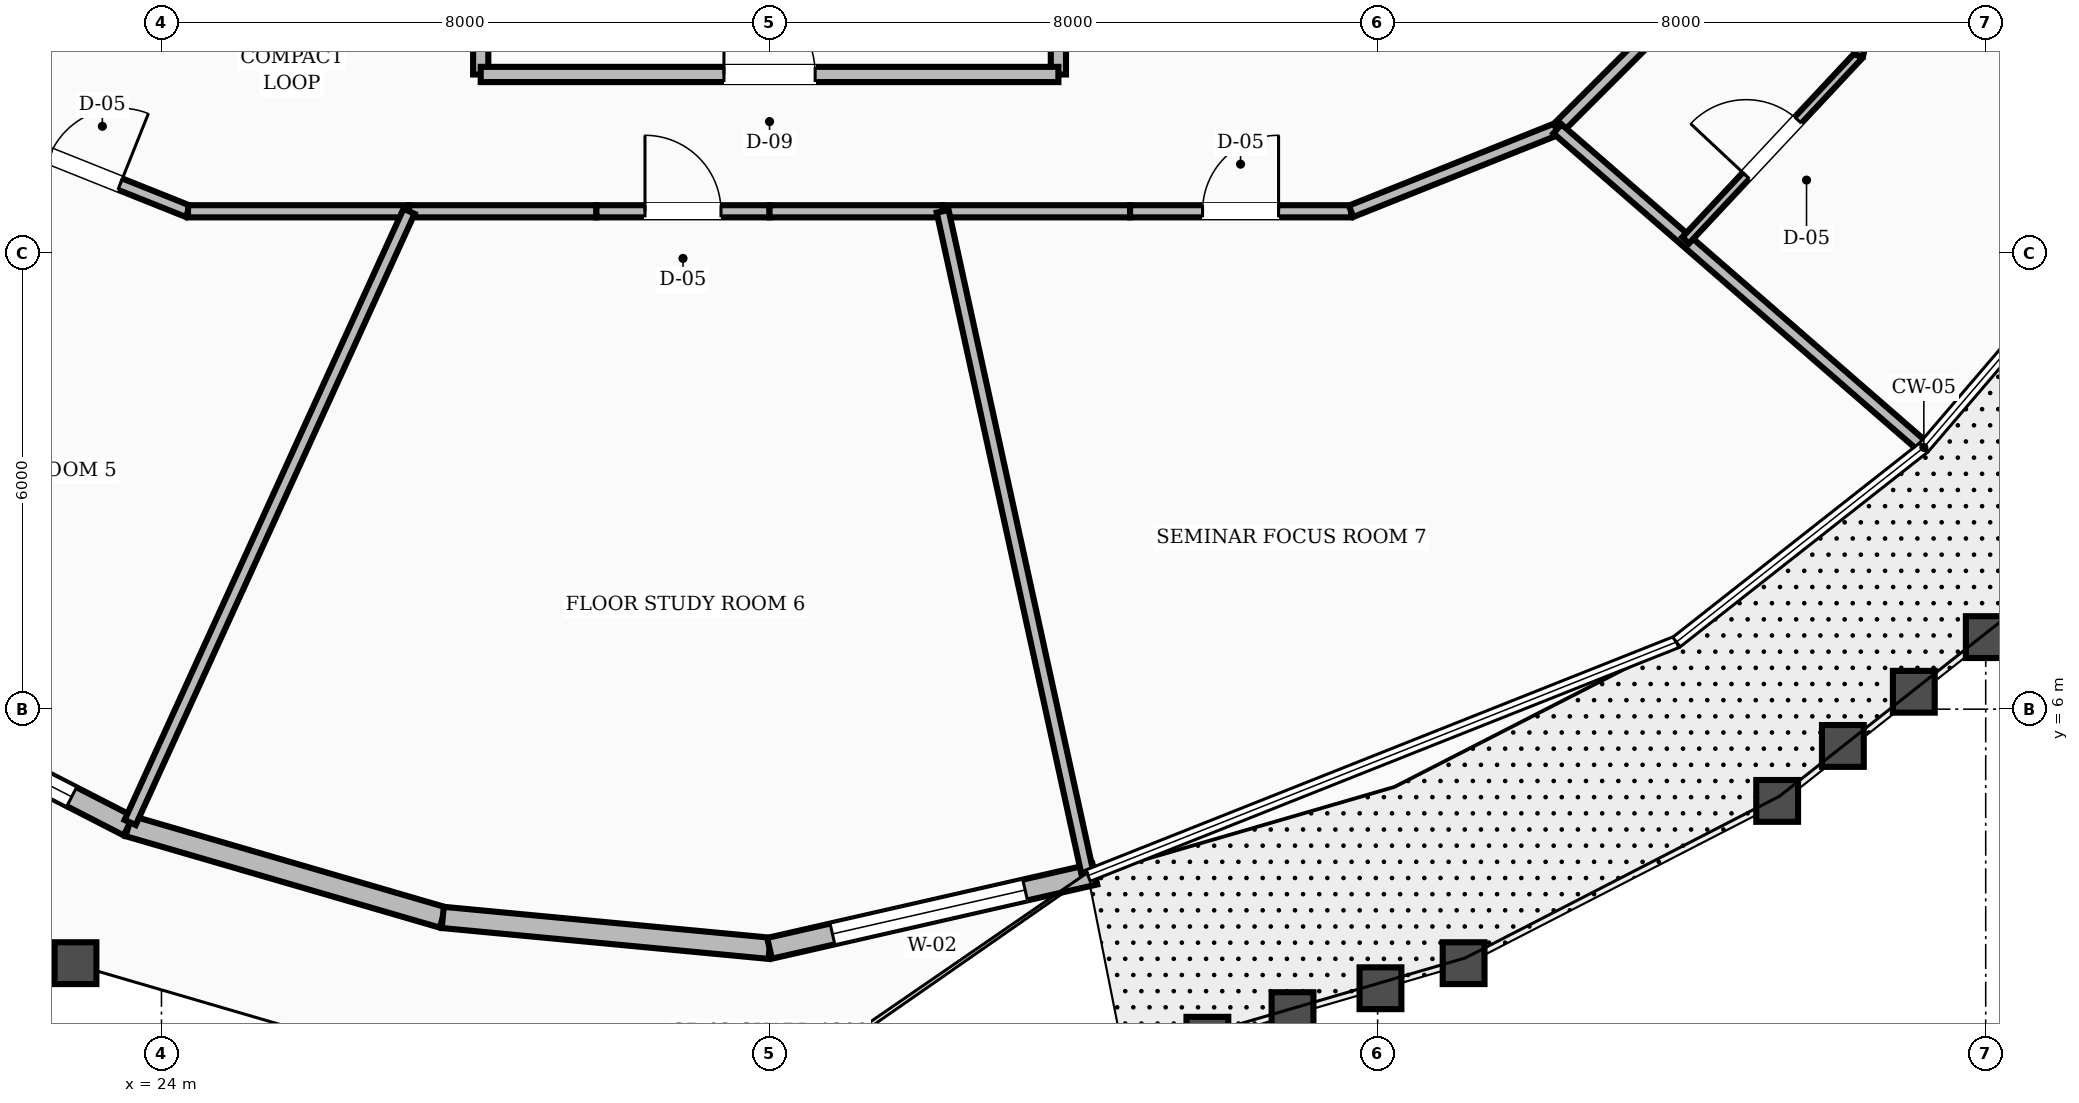
"""IFC4 building model, lengths in metres.
Left out: names, types, materials, properties, quantities, classifications, styles, units other than length and angle.
Written with IfcOpenShell. Run it as: python <this file> out.ifc"""

import sys

from ifc_helpers import new_model, si_unit, direction, frame, frame_2d, origin, place, context, subcontext, project, spatial, rectangle, extrude, element, fill, save


model = new_model("IFC4")
c1 = context("Model", 3, precision=1e-05, world=origin(), true_north=direction((0.0, 1.0)))
c2 = subcontext(c1, "Body", "Model", "MODEL_VIEW")
j1 = project(units=[si_unit("LENGTHUNIT", "METRE"), si_unit("PLANEANGLEUNIT", "RADIAN")], contexts=[c1])
p1 = place(None, origin())
s1 = spatial("IfcSite", under=j1, at=p1, CompositionType="ELEMENT")
p2 = place(p1, origin())
s2 = spatial("IfcBuilding", under=s1, at=p2, CompositionType="ELEMENT")
p3 = place(p2, frame((0.0, 0.0, 236.4)))
s3 = spatial("IfcBuildingStorey", under=s2, at=p3, CompositionType="ELEMENT", Elevation=236.4)
p4 = place(p3, frame((19.757, 6.418, 0.0), z_axis=(0.0, 0.0, 1.0), x_axis=(0.889784216581, -0.456381471933, 0.0)))
e1 = element("IfcWall", 1, at=p4, inside=s3, PredefinedType="STANDARD", context=c2, shape_type="SweptSolid", body=[
    extrude(rectangle(XDim=4.282, YDim=0.28, at=frame_2d((2.141, 0.0))), origin(), (0.0, 0.0, 1.0), 2.88),
])
p5 = place(p4, frame((0.841, 0.0, 0.8)))
e2 = element("IfcOpeningElement", 2, at=p5, cuts=e1, PredefinedType="OPENING", context=c2, shape_type="SweptSolid", body=[
    extrude(rectangle(XDim=2.6, YDim=1.65, at=frame_2d((1.3, 0.825))), frame((0.0, 0.15, 0.0), z_axis=(0.0, -1.0, 0.0), x_axis=(1.0, 0.0, 0.0)), (0.0, 0.0, 1.0), 0.3),
])
p6 = place(p3, frame((23.567, 4.464, 0.0), z_axis=(0.0, 0.0, 1.0), x_axis=(0.960144675866, -0.279503490866, 0.0)))
e3 = element("IfcWall", 3, at=p6, inside=s3, PredefinedType="STANDARD", context=c2, shape_type="SweptSolid", body=[
    extrude(rectangle(XDim=4.305, YDim=0.28, at=frame_2d((2.153, 0.0))), origin(), (0.0, 0.0, 1.0), 2.88),
])
p7 = place(p3, frame((27.701, 3.26, 0.0), z_axis=(0.0, 0.0, 1.0), x_axis=(0.995564827598, -0.094078021076, 0.0)))
e4 = element("IfcWall", 4, at=p7, inside=s3, PredefinedType="STANDARD", context=c2, shape_type="SweptSolid", body=[
    extrude(rectangle(XDim=4.318, YDim=0.28, at=frame_2d((2.159, 0.0))), origin(), (0.0, 0.0, 1.0), 2.88),
])
p8 = place(p3, frame((32.0, 2.854, 0.0), z_axis=(0.0, 0.0, 1.0), x_axis=(0.974962649588, 0.22236868464, 0.0)))
e5 = element("IfcWall", 5, at=p8, inside=s3, PredefinedType="STANDARD", context=c2, shape_type="SweptSolid", body=[
    extrude(rectangle(XDim=4.389, YDim=0.28, at=frame_2d((2.195, 0.0))), origin(), (0.0, 0.0, 1.0), 2.88),
])
p9 = place(p8, frame((0.849, 0.0, 0.8)))
e6 = element("IfcOpeningElement", 6, at=p9, cuts=e5, PredefinedType="OPENING", context=c2, shape_type="SweptSolid", body=[
    extrude(rectangle(XDim=2.6, YDim=1.65, at=frame_2d((1.3, 0.825))), frame((0.0, 0.15, 0.0), z_axis=(0.0, -1.0, 0.0), x_axis=(1.0, 0.0, 0.0)), (0.0, 0.0, 1.0), 0.3),
])
for number, where, z_axis, x_axis in (
    (7, (28.2, 14.35, 0.0), (0.0, 0.0, 1.0), (0.0, 1.0, 0.0)),
    (8, (35.8, 14.35, 0.0), (0.0, 0.0, 1.0), (0.0, 1.0, 0.0)),
):
    element("IfcWall", number, at=place(p3, frame(where, z_axis=z_axis, x_axis=x_axis)), inside=s3, PredefinedType="SOLIDWALL", context=c2, shape_type="SweptSolid", body=[
        extrude(rectangle(XDim=2.2, YDim=0.2, at=frame_2d((1.1, 0.0))), origin(), (0.0, 0.0, 1.0), 2.87),
    ])
p10 = place(p3, frame((28.2, 14.35, 0.0), z_axis=(0.0, 0.0, 1.0), x_axis=(1.0, 0.0, 0.0)))
e9 = element("IfcWall", 9, at=p10, inside=s3, PredefinedType="SOLIDWALL", context=c2, shape_type="SweptSolid", body=[
    extrude(rectangle(XDim=7.6, YDim=0.2, at=frame_2d((3.8, 0.0))), origin(), (0.0, 0.0, 1.0), 2.87),
])
p11 = place(p10, frame((3.2, 0.0, 0.0)))
e10 = element("IfcOpeningElement", 10, at=p11, cuts=e9, PredefinedType="OPENING", context=c2, shape_type="SweptSolid", body=[
    extrude(rectangle(XDim=1.2, YDim=2.1, at=frame_2d((0.6, 1.05))), frame((0.0, 0.11, 0.0), z_axis=(0.0, -1.0, 0.0), x_axis=(1.0, 0.0, 0.0)), (0.0, 0.0, 1.0), 0.22),
])
p12 = place(p3, frame((21.635, 13.635, 0.0), z_axis=(0.0, 0.0, 1.0), x_axis=(0.92856882165, -0.371160266542, 0.0)))
e11 = element("IfcWall", 11, at=p12, inside=s3, PredefinedType="SOLIDWALL", context=c2, shape_type="SweptSolid", body=[
    extrude(rectangle(XDim=2.923, YDim=0.16, at=frame_2d((1.461, 0.0))), origin(), (0.0, 0.0, 1.0), 2.87),
])
p13 = place(p12, frame((0.962, 0.0, 0.0)))
e12 = element("IfcOpeningElement", 12, at=p13, cuts=e11, PredefinedType="OPENING", context=c2, shape_type="SweptSolid", body=[
    extrude(rectangle(XDim=1.0, YDim=2.1, at=frame_2d((0.5, 1.05))), frame((0.0, 0.09, 0.0), z_axis=(0.0, -1.0, 0.0), x_axis=(1.0, 0.0, 0.0)), (0.0, 0.0, 1.0), 0.18),
])
p14 = place(p3, frame((24.349, 12.55, 0.0), z_axis=(0.0, 0.0, 1.0), x_axis=(1.0, 0.0, 0.0)))
e13 = element("IfcWall", 13, at=p14, inside=s3, PredefinedType="SOLIDWALL", context=c2, shape_type="SweptSolid", body=[
    extrude(rectangle(XDim=2.908, YDim=0.16, at=frame_2d((1.454, 0.0))), origin(), (0.0, 0.0, 1.0), 2.87),
])
p15 = place(p3, frame((27.257, 12.55, 0.0), z_axis=(0.0, 0.0, 1.0), x_axis=(1.0, 0.0, 0.0)))
e14 = element("IfcWall", 14, at=p15, inside=s3, PredefinedType="SOLIDWALL", context=c2, shape_type="SweptSolid", body=[
    extrude(rectangle(XDim=2.465, YDim=0.16, at=frame_2d((1.232, 0.0))), origin(), (0.0, 0.0, 1.0), 2.87),
])
p16 = place(p3, frame((29.722, 12.55, 0.0), z_axis=(0.0, 0.0, 1.0), x_axis=(1.0, 0.0, 0.0)))
e15 = element("IfcWall", 15, at=p16, inside=s3, PredefinedType="SOLIDWALL", context=c2, shape_type="SweptSolid", body=[
    extrude(rectangle(XDim=2.278, YDim=0.16, at=frame_2d((1.139, 0.0))), origin(), (0.0, 0.0, 1.0), 2.87),
])
p17 = place(p16, frame((0.639, 0.0, 0.0)))
e16 = element("IfcOpeningElement", 16, at=p17, cuts=e15, PredefinedType="OPENING", context=c2, shape_type="SweptSolid", body=[
    extrude(rectangle(XDim=1.0, YDim=2.1, at=frame_2d((0.5, 1.05))), frame((0.0, 0.09, 0.0), z_axis=(0.0, -1.0, 0.0), x_axis=(1.0, 0.0, 0.0)), (0.0, 0.0, 1.0), 0.18),
])
p18 = place(p3, frame((32.0, 12.55, 0.0), z_axis=(0.0, 0.0, 1.0), x_axis=(1.0, 0.0, 0.0)))
e17 = element("IfcWall", 17, at=p18, inside=s3, PredefinedType="SOLIDWALL", context=c2, shape_type="SweptSolid", body=[
    extrude(rectangle(XDim=2.278, YDim=0.16, at=frame_2d((1.139, 0.0))), origin(), (0.0, 0.0, 1.0), 2.87),
])
p19 = place(p3, frame((34.278, 12.55, 0.0), z_axis=(0.0, 0.0, 1.0), x_axis=(1.0, 0.0, 0.0)))
e18 = element("IfcWall", 18, at=p19, inside=s3, PredefinedType="SOLIDWALL", context=c2, shape_type="SweptSolid", body=[
    extrude(rectangle(XDim=2.465, YDim=0.16, at=frame_2d((1.232, 0.0))), origin(), (0.0, 0.0, 1.0), 2.87),
])
p20 = place(p3, frame((36.743, 12.55, 0.0), z_axis=(0.0, 0.0, 1.0), x_axis=(1.0, 0.0, 0.0)))
e19 = element("IfcWall", 19, at=p20, inside=s3, PredefinedType="SOLIDWALL", context=c2, shape_type="SweptSolid", body=[
    extrude(rectangle(XDim=2.908, YDim=0.16, at=frame_2d((1.454, 0.0))), origin(), (0.0, 0.0, 1.0), 2.87),
])
p21 = place(p20, frame((0.954, 0.0, 0.0)))
e20 = element("IfcOpeningElement", 20, at=p21, cuts=e19, PredefinedType="OPENING", context=c2, shape_type="SweptSolid", body=[
    extrude(rectangle(XDim=1.0, YDim=2.1, at=frame_2d((0.5, 1.05))), frame((0.0, 0.09, 0.0), z_axis=(0.0, -1.0, 0.0), x_axis=(1.0, 0.0, 0.0)), (0.0, 0.0, 1.0), 0.18),
])
p22 = place(p3, frame((39.651, 12.55, 0.0), z_axis=(0.0, 0.0, 1.0), x_axis=(0.92856882165, 0.371160266542, 0.0)))
e21 = element("IfcWall", 21, at=p22, inside=s3, PredefinedType="SOLIDWALL", context=c2, shape_type="SweptSolid", body=[
    extrude(rectangle(XDim=2.923, YDim=0.16, at=frame_2d((1.461, 0.0))), origin(), (0.0, 0.0, 1.0), 2.87),
])
p23 = place(p3, frame((42.365, 13.635, 0.0), z_axis=(0.0, 0.0, 1.0), x_axis=(0.707106781187, 0.707106781187, 0.0)))
e22 = element("IfcWall", 22, at=p23, inside=s3, PredefinedType="SOLIDWALL", context=c2, shape_type="SweptSolid", body=[
    extrude(rectangle(XDim=2.916, YDim=0.16, at=frame_2d((1.458, 0.0))), origin(), (0.0, 0.0, 1.0), 2.87),
])
p24 = place(p3, frame((42.365, 13.635, 0.0), z_axis=(0.0, 0.0, 1.0), x_axis=(0.75465361638, -0.656123402482, 0.0)))
e23 = element("IfcWall", 23, at=p24, inside=s3, PredefinedType="SOLIDWALL", context=c2, shape_type="SweptSolid", body=[
    extrude(rectangle(XDim=6.338, YDim=0.16, at=frame_2d((3.169, 0.0))), origin(), (0.0, 0.0, 1.0), 2.87),
])
p25 = place(p3, frame((44.052, 12.168, 0.0), z_axis=(0.0, 0.0, 1.0), x_axis=(0.683143255068, 0.730284391901, 0.0)))
e24 = element("IfcWall", 24, at=p25, inside=s3, PredefinedType="PARTITIONING", context=c2, shape_type="SweptSolid", body=[
    extrude(rectangle(XDim=3.33, YDim=0.12, at=frame_2d((1.665, 0.0))), origin(), (0.0, 0.0, 1.0), 2.87),
])
p26 = place(p25, frame((1.165, 0.0, 0.0)))
e25 = element("IfcOpeningElement", 25, at=p26, cuts=e24, PredefinedType="OPENING", context=c2, shape_type="SweptSolid", body=[
    extrude(rectangle(XDim=1.0, YDim=2.1, at=frame_2d((0.5, 1.05))), frame((0.0, 0.07, 0.0), z_axis=(0.0, -1.0, 0.0), x_axis=(1.0, 0.0, 0.0)), (0.0, 0.0, 1.0), 0.14),
])
p27 = place(p3, frame((46.327, 14.6, 0.0), z_axis=(0.0, 0.0, 1.0), x_axis=(0.216792083166, 0.976217799815, 0.0)))
e26 = element("IfcWall", 26, at=p27, inside=s3, PredefinedType="PARTITIONING", context=c2, shape_type="SweptSolid", body=[
    extrude(rectangle(XDim=3.363, YDim=0.12, at=frame_2d((1.681, 0.0))), origin(), (0.0, 0.0, 1.0), 2.87),
])
p28 = place(p3, frame((27.257, 12.55, 0.0), z_axis=(0.0, 0.0, 1.0), x_axis=(-0.415155197437, -0.909750604309, 0.0)))
e27 = element("IfcWall", 27, at=p28, inside=s3, PredefinedType="SOLIDWALL", context=c2, shape_type="SweptSolid", body=[
    extrude(rectangle(XDim=8.839, YDim=0.16, at=frame_2d((4.419, 0.0))), origin(), (0.0, 0.0, 1.0), 2.87),
])
p29 = place(p3, frame((34.278, 12.55, 0.0), z_axis=(0.0, 0.0, 1.0), x_axis=(0.213730430707, -0.976892677314, 0.0)))
e28 = element("IfcWall", 28, at=p29, inside=s3, PredefinedType="SOLIDWALL", context=c2, shape_type="SweptSolid", body=[
    extrude(rectangle(XDim=8.897, YDim=0.16, at=frame_2d((4.449, 0.0))), origin(), (0.0, 0.0, 1.0), 2.87),
])
p30 = place(p5, origin())
e29 = element("IfcWindow", 29, at=p30, inside=s3, PartitioningType="SINGLE_PANEL", PredefinedType="WINDOW", context=c2, shape_type="SweptSolid", body=[
    extrude(rectangle(XDim=2.6, YDim=1.65, at=frame_2d((1.3, 0.825))), frame((0.0, 0.03, 0.0), z_axis=(0.0, -1.0, 0.0), x_axis=(1.0, 0.0, 0.0)), (0.0, 0.0, 1.0), 0.06),
])
fill(e2, e29)
p31 = place(p9, origin())
e30 = element("IfcWindow", 30, at=p31, inside=s3, PartitioningType="SINGLE_PANEL", PredefinedType="WINDOW", context=c2, shape_type="SweptSolid", body=[
    extrude(rectangle(XDim=2.6, YDim=1.65, at=frame_2d((1.3, 0.825))), frame((0.0, 0.03, 0.0), z_axis=(0.0, -1.0, 0.0), x_axis=(1.0, 0.0, 0.0)), (0.0, 0.0, 1.0), 0.06),
])
fill(e6, e30)
p32 = place(p11, origin())
e31 = element("IfcDoor", 31, at=p32, inside=s3, OperationType="SINGLE_SWING_LEFT", PredefinedType="DOOR", context=c2, shape_type="SweptSolid", body=[
    extrude(rectangle(XDim=1.2, YDim=2.1, at=frame_2d((0.6, 1.05))), frame((0.0, 0.025, 0.0), z_axis=(0.0, -1.0, 0.0), x_axis=(1.0, 0.0, 0.0)), (0.0, 0.0, 1.0), 0.05),
])
fill(e10, e31)
p33 = place(p26, origin())
e32 = element("IfcDoor", 32, at=p33, inside=s3, OperationType="SINGLE_SWING_LEFT", PredefinedType="DOOR", context=c2, shape_type="SweptSolid", body=[
    extrude(rectangle(XDim=1.0, YDim=2.1, at=frame_2d((0.5, 1.05))), frame((0.0, 0.025, 0.0), z_axis=(0.0, -1.0, 0.0), x_axis=(1.0, 0.0, 0.0)), (0.0, 0.0, 1.0), 0.05),
])
fill(e25, e32)
p34 = place(p13, origin())
e33 = element("IfcDoor", 33, at=p34, inside=s3, OperationType="SINGLE_SWING_RIGHT", PredefinedType="DOOR", context=c2, shape_type="SweptSolid", body=[
    extrude(rectangle(XDim=1.0, YDim=2.1, at=frame_2d((0.5, 1.05))), frame((0.0, 0.025, 0.0), z_axis=(0.0, -1.0, 0.0), x_axis=(1.0, 0.0, 0.0)), (0.0, 0.0, 1.0), 0.05),
])
fill(e12, e33)
p35 = place(p17, origin())
e34 = element("IfcDoor", 34, at=p35, inside=s3, OperationType="SINGLE_SWING_LEFT", PredefinedType="DOOR", context=c2, shape_type="SweptSolid", body=[
    extrude(rectangle(XDim=1.0, YDim=2.1, at=frame_2d((0.5, 1.05))), frame((0.0, 0.025, 0.0), z_axis=(0.0, -1.0, 0.0), x_axis=(1.0, 0.0, 0.0)), (0.0, 0.0, 1.0), 0.05),
])
fill(e16, e34)
p36 = place(p21, origin())
e35 = element("IfcDoor", 35, at=p36, inside=s3, OperationType="SINGLE_SWING_RIGHT", PredefinedType="DOOR", context=c2, shape_type="SweptSolid", body=[
    extrude(rectangle(XDim=1.0, YDim=2.1, at=frame_2d((0.5, 1.05))), frame((0.0, 0.025, 0.0), z_axis=(0.0, -1.0, 0.0), x_axis=(1.0, 0.0, 0.0)), (0.0, 0.0, 1.0), 0.05),
])
fill(e20, e35)
save(model, sys.argv[1])
